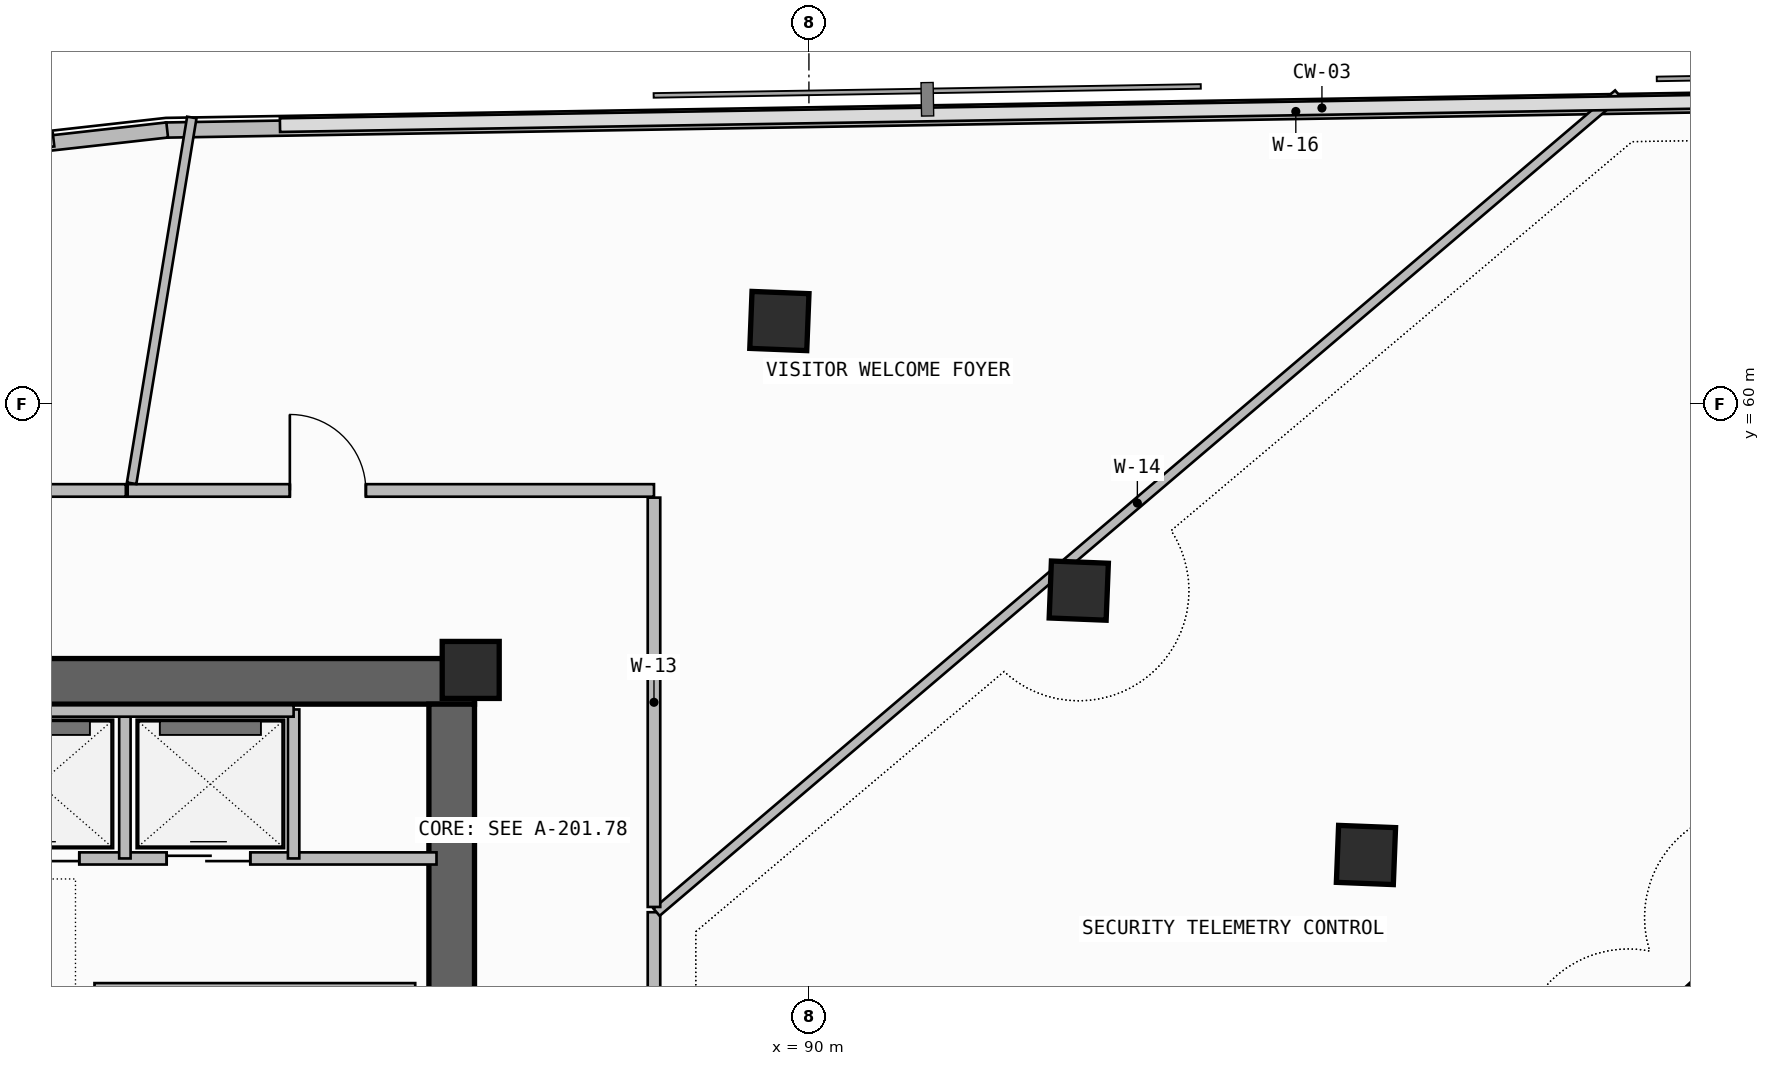
"""IFC4 building model, lengths in metres.
Left out: names, types, materials, properties, quantities, classifications, styles, units other than length and angle.
Written with IfcOpenShell. Run it as: python <this file> out.ifc"""

import sys

from ifc_helpers import new_model, si_unit, direction, frame, frame_2d, origin, origin_2d, place, context, subcontext, project, spatial, rectangle, extrude, element, fill, save


model = new_model("IFC4")
c1 = context("Model", 3, precision=1e-05, world=origin(), true_north=direction((0.0, 1.0)))
c2 = subcontext(c1, "Body", "Model", "MODEL_VIEW")
j1 = project(units=[si_unit("LENGTHUNIT", "METRE"), si_unit("PLANEANGLEUNIT", "RADIAN")], contexts=[c1])
p1 = place(None, origin())
s1 = spatial("IfcSite", under=j1, at=p1, CompositionType="ELEMENT")
p2 = place(p1, origin())
s2 = spatial("IfcBuilding", under=s1, at=p2, CompositionType="ELEMENT")
p3 = place(p2, frame((0.0, 0.0, 278.34)))
s3 = spatial("IfcBuildingStorey", under=s2, at=p3, CompositionType="ELEMENT", Elevation=278.34)
p4 = place(p3, frame((72.0, 56.35, -0.26), z_axis=(0.0, 0.0, 1.0), x_axis=(1.0, 0.0, 0.0)))
e1 = element("IfcWall", 1, at=p4, inside=s3, PredefinedType="SHEAR", context=c2, shape_type="SweptSolid", body=[
    extrude(rectangle(XDim=13.6, YDim=0.6, at=frame_2d((6.8, 0.0))), origin(), (0.0, 0.0, 1.0), 3.52),
])
p5 = place(p3, frame((85.3, 47.6, -0.26), z_axis=(0.0, 0.0, 1.0), x_axis=(0.0, 1.0, 0.0)))
e2 = element("IfcWall", 2, at=p5, inside=s3, PredefinedType="SHEAR", context=c2, shape_type="SweptSolid", body=[
    extrude(rectangle(XDim=8.45, YDim=0.6, at=frame_2d((4.225, 0.0))), origin(), (0.0, 0.0, 1.0), 3.52),
])
for number, where, z_axis, x_axis in (
    (3, (85.55, 56.5, 0.0), (0.0, 0.0, 1.0), (1.0, 0.0, 0.0)),
    (4, (97.329, 54.065, 0.0), (0.0, 0.0, 1.0), (0.039, 0.999, 0.0)),
    (5, (93.55, 57.544, 0.0), (0.0, 0.0, 1.0), (0.039, 0.999, 0.0)),
    (6, (89.611, 61.09, 0.0), (0.0, 0.0, 1.0), (0.039, 0.999, 0.0)),
):
    element("IfcColumn", number, at=place(p3, frame(where, z_axis=z_axis, x_axis=x_axis)), inside=s3, PredefinedType="COLUMN", context=c2, shape_type="SweptSolid", body=[
        extrude(rectangle(XDim=0.75, YDim=0.75, at=origin_2d()), origin(), (0.0, 0.0, 1.0), 3.52),
    ])
p6 = place(p3, frame((90.508, 41.74, -0.26), z_axis=(0.0, 0.0, 1.0), x_axis=(0.734315848115, 0.678807951638, 0.0)))
e7 = element("IfcWall", 7, at=p6, inside=s3, PredefinedType="SHEAR", context=c2, shape_type="SweptSolid", body=[
    extrude(rectangle(XDim=16.573, YDim=0.55, at=frame_2d((8.286, 0.0))), origin(), (0.0, 0.0, 1.0), 3.52),
])
p7 = place(p3, frame((111.271, 64.092, 0.0), z_axis=(0.0, 0.0, 1.0), x_axis=(-0.999864741935, -0.016446818413, 0.0)))
e8 = element("IfcWall", 8, at=p7, inside=s3, PredefinedType="PARAPET", context=c2, shape_type="SweptSolid", body=[
    extrude(rectangle(XDim=29.733, YDim=0.2, at=frame_2d((14.866, 0.0))), origin(), (0.0, 0.0, 1.0), 1.15),
])
p8 = place(p3, frame((81.557, 63.604, 0.0), z_axis=(0.0, 0.0, 1.0), x_axis=(-0.993776455024, -0.111392806945, 0.0)))
e9 = element("IfcWall", 9, at=p8, inside=s3, PredefinedType="PARAPET", context=c2, shape_type="SweptSolid", body=[
    extrude(rectangle(XDim=24.891, YDim=0.2, at=frame_2d((12.446, 0.0))), origin(), (0.0, 0.0, 1.0), 1.15),
])
p9 = place(p3, frame((80.6, 52.3, 0.0), z_axis=(0.0, 0.0, 1.0), x_axis=(1.0, 0.0, 0.0)))
e10 = element("IfcWall", 10, at=p9, inside=s3, PredefinedType="SOLIDWALL", context=c2, shape_type="SweptSolid", body=[
    extrude(rectangle(XDim=4.22, YDim=0.16, at=frame_2d((2.11, 0.0))), origin(), (0.0, 0.0, 1.0), 3.26),
])
p10 = place(p3, frame((73.02, 54.02, 0.0), z_axis=(0.0, 0.0, 1.0), x_axis=(1.0, 0.0, 0.0)))
e11 = element("IfcWall", 11, at=p10, inside=s3, PredefinedType="SOLIDWALL", context=c2, shape_type="SweptSolid", body=[
    extrude(rectangle(XDim=12.08, YDim=0.16, at=frame_2d((6.04, 0.0))), origin(), (0.0, 0.0, 1.0), 3.26),
])
p11 = place(p10, frame((4.03, 0.0, 0.0)))
e12 = element("IfcOpeningElement", 12, at=p11, cuts=e11, PredefinedType="OPENING", context=c2, shape_type="SweptSolid", body=[
    extrude(rectangle(XDim=1.1, YDim=2.25, at=frame_2d((0.55, 1.125))), frame((0.0, 0.09, 0.0), z_axis=(0.0, -1.0, 0.0), x_axis=(1.0, 0.0, 0.0)), (0.0, 0.0, 1.0), 0.18),
])
p12 = place(p10, frame((6.28, 0.0, 0.0)))
e13 = element("IfcOpeningElement", 13, at=p12, cuts=e11, PredefinedType="OPENING", context=c2, shape_type="SweptSolid", body=[
    extrude(rectangle(XDim=1.1, YDim=2.25, at=frame_2d((0.55, 1.125))), frame((0.0, 0.09, 0.0), z_axis=(0.0, -1.0, 0.0), x_axis=(1.0, 0.0, 0.0)), (0.0, 0.0, 1.0), 0.18),
])
p13 = place(p10, frame((8.53, 0.0, 0.0)))
e14 = element("IfcOpeningElement", 14, at=p13, cuts=e11, PredefinedType="OPENING", context=c2, shape_type="SweptSolid", body=[
    extrude(rectangle(XDim=1.1, YDim=2.25, at=frame_2d((0.55, 1.125))), frame((0.0, 0.09, 0.0), z_axis=(0.0, -1.0, 0.0), x_axis=(1.0, 0.0, 0.0)), (0.0, 0.0, 1.0), 0.18),
])
p14 = place(p3, frame((81.0, 54.02, 0.0), z_axis=(0.0, 0.0, 1.0), x_axis=(0.0, 1.0, 0.0)))
e15 = element("IfcWall", 15, at=p14, inside=s3, PredefinedType="PLUMBINGWALL", context=c2, shape_type="SweptSolid", body=[
    extrude(rectangle(XDim=1.96, YDim=0.15, at=frame_2d((0.98, 0.0))), origin(), (0.0, 0.0, 1.0), 3.26),
])
p15 = place(p3, frame((83.22, 54.02, 0.0), z_axis=(0.0, 0.0, 1.0), x_axis=(0.0, 1.0, 0.0)))
e16 = element("IfcWall", 16, at=p15, inside=s3, PredefinedType="SOLIDWALL", context=c2, shape_type="SweptSolid", body=[
    extrude(rectangle(XDim=1.96, YDim=0.15, at=frame_2d((0.98, 0.0))), origin(), (0.0, 0.0, 1.0), 3.26),
])
p16 = place(p3, frame((76.52, 55.96, 0.0), z_axis=(0.0, 0.0, 1.0), x_axis=(1.0, 0.0, 0.0)))
e17 = element("IfcWall", 17, at=p16, inside=s3, PredefinedType="SOLIDWALL", context=c2, shape_type="SweptSolid", body=[
    extrude(rectangle(XDim=6.7, YDim=0.15, at=frame_2d((3.35, 0.0))), origin(), (0.0, 0.0, 1.0), 3.26),
])
p17 = place(p3, frame((87.961, 47.62, 0.0), z_axis=(0.0, 0.0, 1.0), x_axis=(0.0, 1.0, 0.0)))
e18 = element("IfcWall", 18, at=p17, inside=s3, PredefinedType="PARTITIONING", context=c2, shape_type="SweptSolid", body=[
    extrude(rectangle(XDim=5.692, YDim=0.165, at=frame_2d((2.846, 0.0))), origin(), (0.0, 0.0, 1.0), 3.26),
])
p18 = place(p17, frame((2.346, 0.0, 0.0)))
e19 = element("IfcOpeningElement", 19, at=p18, cuts=e18, PredefinedType="OPENING", context=c2, shape_type="SweptSolid", body=[
    extrude(rectangle(XDim=1.0, YDim=2.2, at=frame_2d((0.5, 1.1))), frame((0.0, 0.093, 0.0), z_axis=(0.0, -1.0, 0.0), x_axis=(1.0, 0.0, 0.0)), (0.0, 0.0, 1.0), 0.185),
])
p19 = place(p3, frame((87.995, 53.312, 0.0), z_axis=(0.0, 0.0, 1.0), x_axis=(0.761637538475, 0.648003287018, 0.0)))
e20 = element("IfcWall", 20, at=p19, inside=s3, PredefinedType="PARTITIONING", context=c2, shape_type="SweptSolid", body=[
    extrude(rectangle(XDim=16.612, YDim=0.125, at=frame_2d((8.306, 0.0))), origin(), (0.0, 0.0, 1.0), 2.645),
])
p20 = place(p3, frame((87.961, 58.861, 0.0), z_axis=(0.0, 0.0, 1.0), x_axis=(-1.0, 0.0, 0.0)))
e21 = element("IfcWall", 21, at=p20, inside=s3, PredefinedType="PARTITIONING", context=c2, shape_type="SweptSolid", body=[
    extrude(rectangle(XDim=6.925, YDim=0.165, at=frame_2d((3.462, 0.0))), origin(), (0.0, 0.0, 1.0), 2.745),
])
p21 = place(p20, frame((3.791, 0.0, 0.0)))
e22 = element("IfcOpeningElement", 22, at=p21, cuts=e21, PredefinedType="OPENING", context=c2, shape_type="SweptSolid", body=[
    extrude(rectangle(XDim=1.0, YDim=2.2, at=frame_2d((0.5, 1.1))), frame((0.0, 0.093, 0.0), z_axis=(0.0, -1.0, 0.0), x_axis=(1.0, 0.0, 0.0)), (0.0, 0.0, 1.0), 0.185),
])
p22 = place(p3, frame((87.961, 53.382, 0.0), z_axis=(0.0, 0.0, 1.0), x_axis=(0.0, 1.0, 0.0)))
e23 = element("IfcWall", 23, at=p22, inside=s3, PredefinedType="PARTITIONING", context=c2, shape_type="SweptSolid", body=[
    extrude(rectangle(XDim=5.385, YDim=0.165, at=frame_2d((2.692, 0.0))), origin(), (0.0, 0.0, 1.0), 2.745),
])
p23 = place(p3, frame((81.089, 58.956, 0.0), z_axis=(0.0, 0.0, 1.0), x_axis=(0.162336796207, 0.986735407593, 0.0)))
e24 = element("IfcWall", 24, at=p23, inside=s3, PredefinedType="PARTITIONING", context=c2, shape_type="SweptSolid", body=[
    extrude(rectangle(XDim=4.877, YDim=0.125, at=frame_2d((2.438, 0.0))), origin(), (0.0, 0.0, 1.0), 3.26),
])
p24 = place(p3, frame((81.012, 58.861, 0.0), z_axis=(0.0, 0.0, 1.0), x_axis=(-1.0, 0.0, 0.0)))
e25 = element("IfcWall", 25, at=p24, inside=s3, PredefinedType="PARTITIONING", context=c2, shape_type="SweptSolid", body=[
    extrude(rectangle(XDim=1.268, YDim=0.165, at=frame_2d((0.634, 0.0))), origin(), (0.0, 0.0, 1.0), 3.26),
])
p25 = place(p12, origin())
e26 = element("IfcDoor", 26, at=p25, inside=s3, OperationType="DOUBLE_DOOR_SLIDING", PredefinedType="DOOR", context=c2, shape_type="SweptSolid", body=[
    extrude(rectangle(XDim=1.1, YDim=2.25, at=frame_2d((0.55, 1.125))), frame((0.0, 0.025, 0.0), z_axis=(0.0, -1.0, 0.0), x_axis=(1.0, 0.0, 0.0)), (0.0, 0.0, 1.0), 0.05),
])
fill(e13, e26)
p26 = place(p13, origin())
e27 = element("IfcDoor", 27, at=p26, inside=s3, OperationType="DOUBLE_DOOR_SLIDING", PredefinedType="DOOR", context=c2, shape_type="SweptSolid", body=[
    extrude(rectangle(XDim=1.1, YDim=2.25, at=frame_2d((0.55, 1.125))), frame((0.0, 0.025, 0.0), z_axis=(0.0, -1.0, 0.0), x_axis=(1.0, 0.0, 0.0)), (0.0, 0.0, 1.0), 0.05),
])
fill(e14, e27)
p27 = place(p21, frame((1.0, 0.0, 0.0), z_axis=(0.0, 0.0, 1.0), x_axis=(-1.0, 0.0, 0.0)))
e28 = element("IfcDoor", 28, at=p27, inside=s3, OperationType="SINGLE_SWING_LEFT", PredefinedType="DOOR", context=c2, shape_type="SweptSolid", body=[
    extrude(rectangle(XDim=1.0, YDim=2.2, at=frame_2d((0.5, 1.1))), frame((0.0, 0.025, 0.0), z_axis=(0.0, -1.0, 0.0), x_axis=(1.0, 0.0, 0.0)), (0.0, 0.0, 1.0), 0.05),
])
fill(e22, e28)
save(model, sys.argv[1])
